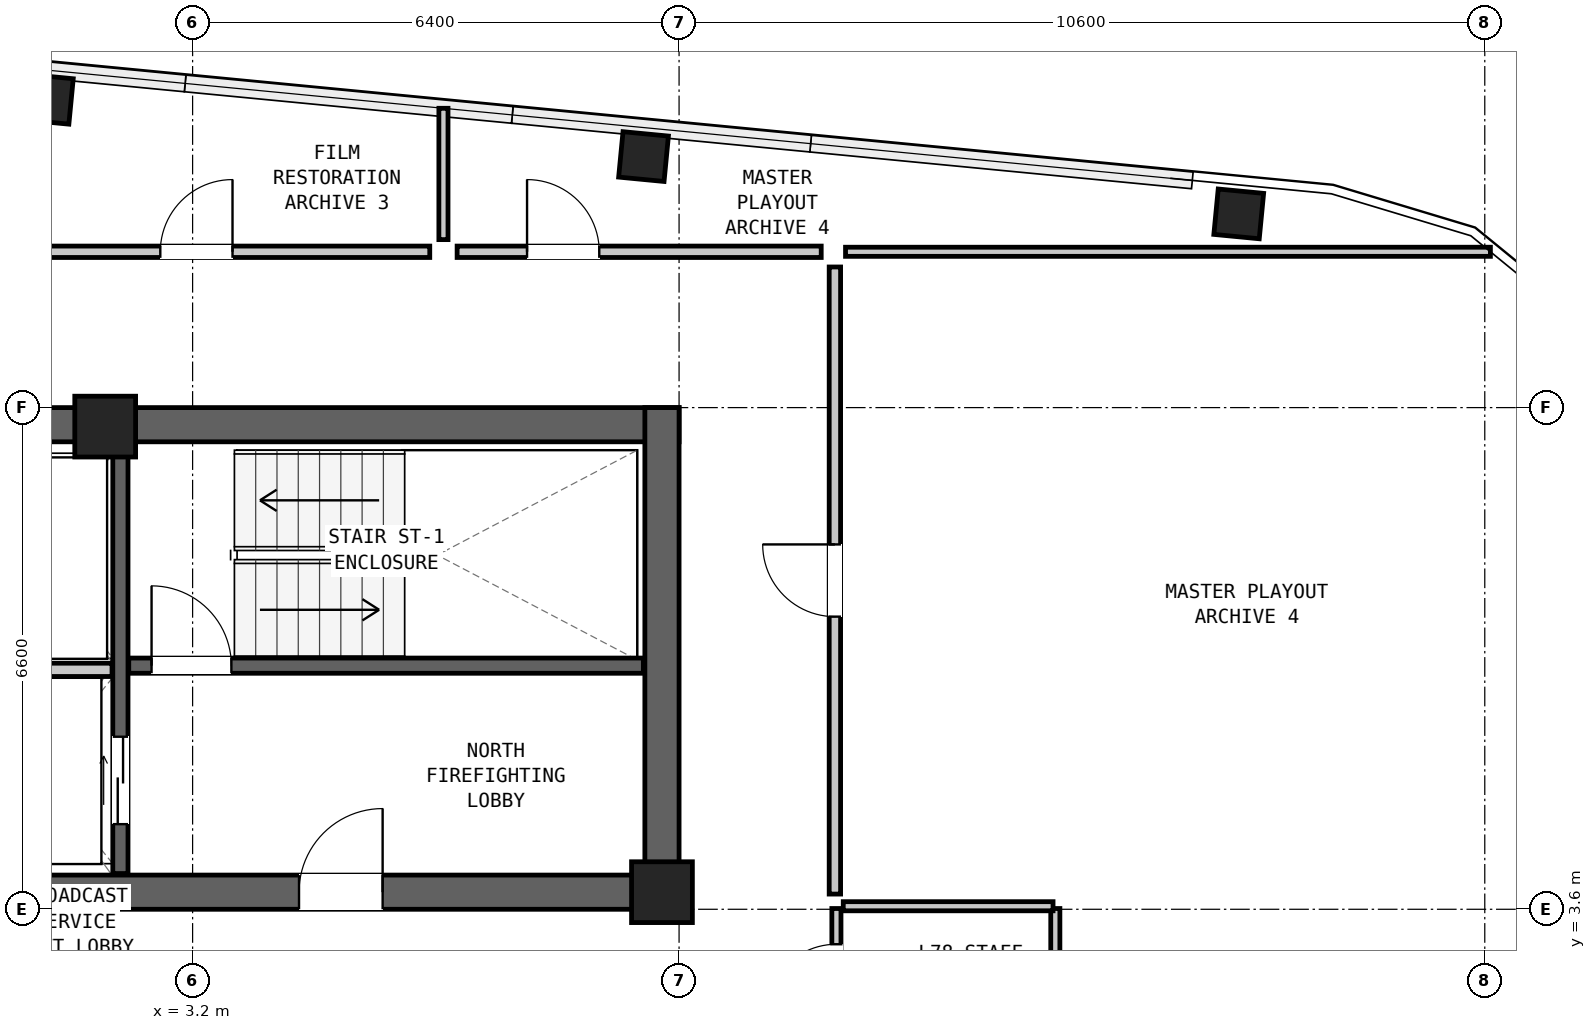
"""IFC4 building model, lengths in metres.
Left out: names, types, materials, properties, quantities, classifications, styles, units other than length and angle.
Written with IfcOpenShell. Run it as: python <this file> out.ifc"""

import sys

from ifc_helpers import new_model, si_unit, direction, frame, frame_2d, origin, origin_2d, place, context, subcontext, project, spatial, rectangle, hollow_rectangle, extrude, element, fill, save


model = new_model("IFC4")
c1 = context("Model", 3, precision=1e-05, world=origin(), true_north=direction((0.0, 1.0)))
c2 = subcontext(c1, "Body", "Model", "MODEL_VIEW")
j1 = project(units=[si_unit("LENGTHUNIT", "METRE"), si_unit("PLANEANGLEUNIT", "RADIAN")], contexts=[c1])
p1 = place(None, origin())
s1 = spatial("IfcSite", under=j1, at=p1, CompositionType="ELEMENT")
p2 = place(p1, origin())
s2 = spatial("IfcBuilding", under=s1, at=p2, CompositionType="ELEMENT")
p3 = place(p2, frame((0.0, 0.0, 264.2)))
s3 = spatial("IfcBuildingStorey", under=s2, at=p3, CompositionType="ELEMENT", Elevation=264.2)
p4 = place(p3, frame((-9.6, 9.975, 0.0), z_axis=(0.0, 0.0, 1.0), x_axis=(1.0, 0.0, 0.0)))
e1 = element("IfcWall", 1, at=p4, inside=s3, PredefinedType="SHEAR", context=c2, shape_type="SweptSolid", body=[
    extrude(rectangle(XDim=19.2, YDim=0.45, at=frame_2d((9.6, 0.0))), origin(), (0.0, 0.0, 1.0), 3.05),
])
p5 = place(p3, frame((-9.6, 3.825, 0.0), z_axis=(0.0, 0.0, 1.0), x_axis=(1.0, 0.0, 0.0)))
e2 = element("IfcWall", 2, at=p5, inside=s3, PredefinedType="SHEAR", context=c2, shape_type="SweptSolid", body=[
    extrude(rectangle(XDim=19.2, YDim=0.45, at=frame_2d((9.6, 0.0))), origin(), (0.0, 0.0, 1.0), 3.05),
])
p6 = place(p5, frame((14.2, 0.0, 0.0)))
e3 = element("IfcOpeningElement", 3, at=p6, cuts=e2, PredefinedType="OPENING", context=c2, shape_type="SweptSolid", body=[
    extrude(rectangle(XDim=1.1, YDim=2.08, at=frame_2d((0.55, 1.04))), frame((0.0, 0.237, 0.0), z_axis=(0.0, -1.0, 0.0), x_axis=(1.0, 0.0, 0.0)), (0.0, 0.0, 1.0), 0.474),
])
p7 = place(p5, frame((8.2, 0.0, 0.0)))
e4 = element("IfcOpeningElement", 4, at=p7, cuts=e2, PredefinedType="OPENING", context=c2, shape_type="SweptSolid", body=[
    extrude(rectangle(XDim=1.15, YDim=2.1, at=frame_2d((0.575, 1.05))), frame((0.0, 0.237, 0.0), z_axis=(0.0, -1.0, 0.0), x_axis=(1.0, 0.0, 0.0)), (0.0, 0.0, 1.0), 0.474),
])
p8 = place(p5, frame((2.5, 0.0, 0.0)))
e5 = element("IfcOpeningElement", 5, at=p8, cuts=e2, PredefinedType="OPENING", context=c2, shape_type="SweptSolid", body=[
    extrude(rectangle(XDim=1.6, YDim=2.12, at=frame_2d((0.8, 1.06))), frame((0.0, 0.237, 0.0), z_axis=(0.0, -1.0, 0.0), x_axis=(1.0, 0.0, 0.0)), (0.0, 0.0, 1.0), 0.474),
])
p9 = place(p3, frame((9.375, 3.6, 0.0), z_axis=(0.0, 0.0, 1.0), x_axis=(0.0, 1.0, 0.0)))
e6 = element("IfcWall", 6, at=p9, inside=s3, PredefinedType="SHEAR", context=c2, shape_type="SweptSolid", body=[
    extrude(rectangle(XDim=6.6, YDim=0.45, at=frame_2d((3.3, 0.0))), origin(), (0.0, 0.0, 1.0), 3.05),
])
for number, where, z_axis, x_axis in (
    (7, (16.963, 12.749, 0.0), (0.0, 0.0, 1.0), (0.995, -0.096, 0.0)),
    (8, (9.133, 13.502, 0.0), (0.0, 0.0, 1.0), (0.995, -0.096, 0.0)),
    (9, (1.302, 14.256, 0.0), (0.0, 0.0, 1.0), (0.995, -0.096, 0.0)),
):
    element("IfcColumn", number, at=place(p3, frame(where, z_axis=z_axis, x_axis=x_axis)), inside=s3, PredefinedType="COLUMN", context=c2, shape_type="SweptSolid", body=[
        extrude(hollow_rectangle(XDim=0.6, YDim=0.6, WallThickness=0.04, at=origin_2d()), origin(), (0.0, 0.0, 1.0), 3.05),
    ])
for number, where, z_axis, x_axis in (
    (10, (2.05, 9.95, 0.0), (0.0, 0.0, 1.0), (1.0, 0.0, 0.0)),
    (11, (9.375, 3.825, 0.0), (0.0, 0.0, 1.0), (1.0, 0.0, 0.0)),
):
    element("IfcColumn", number, at=place(p3, frame(where, z_axis=z_axis, x_axis=x_axis)), inside=s3, PredefinedType="COLUMN", context=c2, shape_type="SweptSolid", body=[
        extrude(rectangle(XDim=0.8, YDim=0.8, at=origin_2d()), origin(), (0.0, 0.0, 1.0), 3.05),
    ])
p10 = place(p3, frame((2.36, 6.805, 0.0), z_axis=(0.0, 0.0, 1.0), x_axis=(1.0, 0.0, 0.0)))
e12 = element("IfcWall", 12, at=p10, inside=s3, PredefinedType="SHEAR", context=c2, shape_type="SweptSolid", body=[
    extrude(rectangle(XDim=6.77, YDim=0.2, at=frame_2d((3.385, 0.0))), origin(), (0.0, 0.0, 1.0), 2.86),
])
p11 = place(p10, frame((0.3, 0.0, 0.0)))
e13 = element("IfcOpeningElement", 13, at=p11, cuts=e12, PredefinedType="OPENING", context=c2, shape_type="SweptSolid", body=[
    extrude(rectangle(XDim=1.05, YDim=2.08, at=frame_2d((0.525, 1.04))), frame((0.0, 0.112, 0.0), z_axis=(0.0, -1.0, 0.0), x_axis=(1.0, 0.0, 0.0)), (0.0, 0.0, 1.0), 0.224),
])
p12 = place(p3, frame((2.25, 4.07, 0.0), z_axis=(0.0, 0.0, 1.0), x_axis=(0.0, 1.0, 0.0)))
e14 = element("IfcWall", 14, at=p12, inside=s3, PredefinedType="SHEAR", context=c2, shape_type="SweptSolid", body=[
    extrude(rectangle(XDim=5.66, YDim=0.2, at=frame_2d((2.83, 0.0))), origin(), (0.0, 0.0, 1.0), 2.86),
])
p13 = place(p12, frame((0.65, 0.0, 0.0)))
e15 = element("IfcOpeningElement", 15, at=p13, cuts=e14, PredefinedType="OPENING", context=c2, shape_type="SweptSolid", body=[
    extrude(rectangle(XDim=1.15, YDim=2.08, at=frame_2d((0.575, 1.04))), frame((0.0, 0.112, 0.0), z_axis=(0.0, -1.0, 0.0), x_axis=(1.0, 0.0, 0.0)), (0.0, 0.0, 1.0), 0.224),
])
p14 = place(p3, frame((0.16, 6.75, 0.0), z_axis=(0.0, 0.0, 1.0), x_axis=(1.0, 0.0, 0.0)))
e16 = element("IfcWall", 16, at=p14, inside=s3, PredefinedType="PARTITIONING", context=c2, shape_type="SweptSolid", body=[
    extrude(rectangle(XDim=1.98, YDim=0.175, at=frame_2d((0.99, 0.0))), origin(), (0.0, 0.0, 1.0), 2.86),
])
p15 = place(p3, frame((11.67, 1.78, 0.0), z_axis=(0.0, 0.0, 1.0), x_axis=(0.0, 1.0, 0.0)))
e17 = element("IfcWall", 17, at=p15, inside=s3, PredefinedType="PARTITIONING", context=c2, shape_type="SweptSolid", body=[
    extrude(rectangle(XDim=1.83, YDim=0.12, at=frame_2d((0.915, 0.0))), origin(), (0.0, 0.0, 1.0), 2.86),
])
p16 = place(p15, frame((0.44, 0.0, 0.0)))
e18 = element("IfcOpeningElement", 18, at=p16, cuts=e17, PredefinedType="OPENING", context=c2, shape_type="SweptSolid", body=[
    extrude(rectangle(XDim=0.92, YDim=2.1, at=frame_2d((0.46, 1.05))), frame((0.0, 0.072, 0.0), z_axis=(0.0, -1.0, 0.0), x_axis=(1.0, 0.0, 0.0)), (0.0, 0.0, 1.0), 0.144),
])
p17 = place(p3, frame((14.55, -2.32, 0.0), z_axis=(0.0, 0.0, 1.0), x_axis=(0.0, 1.0, 0.0)))
e19 = element("IfcWall", 19, at=p17, inside=s3, PredefinedType="PARTITIONING", context=c2, shape_type="SweptSolid", body=[
    extrude(rectangle(XDim=5.93, YDim=0.12, at=frame_2d((2.965, 0.0))), origin(), (0.0, 0.0, 1.0), 2.86),
])
p18 = place(p3, frame((11.76, 3.64, 0.0), z_axis=(0.0, 0.0, 1.0), x_axis=(1.0, 0.0, 0.0)))
e20 = element("IfcWall", 20, at=p18, inside=s3, PredefinedType="PARTITIONING", context=c2, shape_type="SweptSolid", body=[
    extrude(rectangle(XDim=2.76, YDim=0.12, at=frame_2d((1.38, 0.0))), origin(), (0.0, 0.0, 1.0), 1.981),
])
p19 = place(p3, frame((11.79, 12.25, 0.0), z_axis=(0.0, 0.0, 1.0), x_axis=(1.0, 0.0, 0.0)))
e21 = element("IfcWall", 21, at=p19, inside=s3, PredefinedType="PARTITIONING", context=c2, shape_type="SweptSolid", body=[
    extrude(rectangle(XDim=8.484, YDim=0.12, at=frame_2d((4.242, 0.0))), origin(), (0.0, 0.0, 1.0), 2.86),
])
p20 = place(p3, frame((6.5, 12.41, 0.0), z_axis=(0.0, 0.0, 1.0), x_axis=(0.0, 1.0, 0.0)))
e22 = element("IfcWall", 22, at=p20, inside=s3, PredefinedType="PARTITIONING", context=c2, shape_type="SweptSolid", body=[
    extrude(rectangle(XDim=1.728, YDim=0.12, at=frame_2d((0.864, 0.0))), origin(), (0.0, 0.0, 1.0), 2.381),
])
p21 = place(p3, frame((0.18, 12.25, 0.0), z_axis=(0.0, 0.0, 1.0), x_axis=(1.0, 0.0, 0.0)))
e23 = element("IfcWall", 23, at=p21, inside=s3, PredefinedType="PARTITIONING", context=c2, shape_type="SweptSolid", body=[
    extrude(rectangle(XDim=6.14, YDim=0.15, at=frame_2d((3.07, 0.0))), origin(), (0.0, 0.0, 1.0), 2.86),
])
p22 = place(p21, frame((2.595, 0.0, 0.0)))
e24 = element("IfcOpeningElement", 24, at=p22, cuts=e23, PredefinedType="OPENING", context=c2, shape_type="SweptSolid", body=[
    extrude(rectangle(XDim=0.95, YDim=2.1, at=frame_2d((0.475, 1.05))), frame((0.0, 0.087, 0.0), z_axis=(0.0, -1.0, 0.0), x_axis=(1.0, 0.0, 0.0)), (0.0, 0.0, 1.0), 0.174),
])
p23 = place(p3, frame((6.68, 12.25, 0.0), z_axis=(0.0, 0.0, 1.0), x_axis=(1.0, 0.0, 0.0)))
e25 = element("IfcWall", 25, at=p23, inside=s3, PredefinedType="PARTITIONING", context=c2, shape_type="SweptSolid", body=[
    extrude(rectangle(XDim=4.79, YDim=0.15, at=frame_2d((2.395, 0.0))), origin(), (0.0, 0.0, 1.0), 2.86),
])
p24 = place(p23, frame((0.92, 0.0, 0.0)))
e26 = element("IfcOpeningElement", 26, at=p24, cuts=e25, PredefinedType="OPENING", context=c2, shape_type="SweptSolid", body=[
    extrude(rectangle(XDim=0.95, YDim=2.1, at=frame_2d((0.475, 1.05))), frame((0.0, 0.087, 0.0), z_axis=(0.0, -1.0, 0.0), x_axis=(1.0, 0.0, 0.0)), (0.0, 0.0, 1.0), 0.174),
])
p25 = place(p3, frame((11.65, 3.8, 0.0), z_axis=(0.0, 0.0, 1.0), x_axis=(0.0, 1.0, 0.0)))
e27 = element("IfcWall", 27, at=p25, inside=s3, PredefinedType="PARTITIONING", context=c2, shape_type="SweptSolid", body=[
    extrude(rectangle(XDim=8.25, YDim=0.15, at=frame_2d((4.125, 0.0))), origin(), (0.0, 0.0, 1.0), 2.86),
])
p26 = place(p25, frame((3.65, 0.0, 0.0)))
e28 = element("IfcOpeningElement", 28, at=p26, cuts=e27, PredefinedType="OPENING", context=c2, shape_type="SweptSolid", body=[
    extrude(rectangle(XDim=0.95, YDim=2.1, at=frame_2d((0.475, 1.05))), frame((0.0, 0.087, 0.0), z_axis=(0.0, -1.0, 0.0), x_axis=(1.0, 0.0, 0.0)), (0.0, 0.0, 1.0), 0.174),
])
p27 = place(p11, origin())
e29 = element("IfcDoor", 29, at=p27, inside=s3, OperationType="SINGLE_SWING_LEFT", PredefinedType="DOOR", context=c2, shape_type="SweptSolid", body=[
    extrude(rectangle(XDim=1.05, YDim=2.08, at=frame_2d((0.525, 1.04))), frame((0.0, 0.025, 0.0), z_axis=(0.0, -1.0, 0.0), x_axis=(1.0, 0.0, 0.0)), (0.0, 0.0, 1.0), 0.05),
])
fill(e13, e29)
p28 = place(p6, origin())
e30 = element("IfcDoor", 30, at=p28, inside=s3, OperationType="SINGLE_SWING_RIGHT", PredefinedType="DOOR", context=c2, shape_type="SweptSolid", body=[
    extrude(rectangle(XDim=1.1, YDim=2.08, at=frame_2d((0.55, 1.04))), frame((0.0, 0.025, 0.0), z_axis=(0.0, -1.0, 0.0), x_axis=(1.0, 0.0, 0.0)), (0.0, 0.0, 1.0), 0.05),
])
fill(e3, e30)
p29 = place(p13, origin())
e31 = element("IfcDoor", 31, at=p29, inside=s3, OperationType="DOUBLE_DOOR_SLIDING", PredefinedType="DOOR", context=c2, shape_type="SweptSolid", body=[
    extrude(rectangle(XDim=1.15, YDim=2.08, at=frame_2d((0.575, 1.04))), frame((0.0, 0.025, 0.0), z_axis=(0.0, -1.0, 0.0), x_axis=(1.0, 0.0, 0.0)), (0.0, 0.0, 1.0), 0.05),
])
fill(e15, e31)
p30 = place(p16, origin())
e32 = element("IfcDoor", 32, at=p30, inside=s3, OperationType="SINGLE_SWING_LEFT", PredefinedType="DOOR", context=c2, shape_type="SweptSolid", body=[
    extrude(rectangle(XDim=0.92, YDim=2.1, at=frame_2d((0.46, 1.05))), frame((0.0, 0.025, 0.0), z_axis=(0.0, -1.0, 0.0), x_axis=(1.0, 0.0, 0.0)), (0.0, 0.0, 1.0), 0.05),
])
fill(e18, e32)
p31 = place(p22, origin())
e33 = element("IfcDoor", 33, at=p31, inside=s3, OperationType="SINGLE_SWING_RIGHT", PredefinedType="DOOR", context=c2, shape_type="SweptSolid", body=[
    extrude(rectangle(XDim=0.95, YDim=2.1, at=frame_2d((0.475, 1.05))), frame((0.0, 0.025, 0.0), z_axis=(0.0, -1.0, 0.0), x_axis=(1.0, 0.0, 0.0)), (0.0, 0.0, 1.0), 0.05),
])
fill(e24, e33)
p32 = place(p24, origin())
e34 = element("IfcDoor", 34, at=p32, inside=s3, OperationType="SINGLE_SWING_LEFT", PredefinedType="DOOR", context=c2, shape_type="SweptSolid", body=[
    extrude(rectangle(XDim=0.95, YDim=2.1, at=frame_2d((0.475, 1.05))), frame((0.0, 0.025, 0.0), z_axis=(0.0, -1.0, 0.0), x_axis=(1.0, 0.0, 0.0)), (0.0, 0.0, 1.0), 0.05),
])
fill(e26, e34)
p33 = place(p26, origin())
e35 = element("IfcDoor", 35, at=p33, inside=s3, OperationType="SINGLE_SWING_RIGHT", PredefinedType="DOOR", context=c2, shape_type="SweptSolid", body=[
    extrude(rectangle(XDim=0.95, YDim=2.1, at=frame_2d((0.475, 1.05))), frame((0.0, 0.025, 0.0), z_axis=(0.0, -1.0, 0.0), x_axis=(1.0, 0.0, 0.0)), (0.0, 0.0, 1.0), 0.05),
])
fill(e28, e35)
save(model, sys.argv[1])
